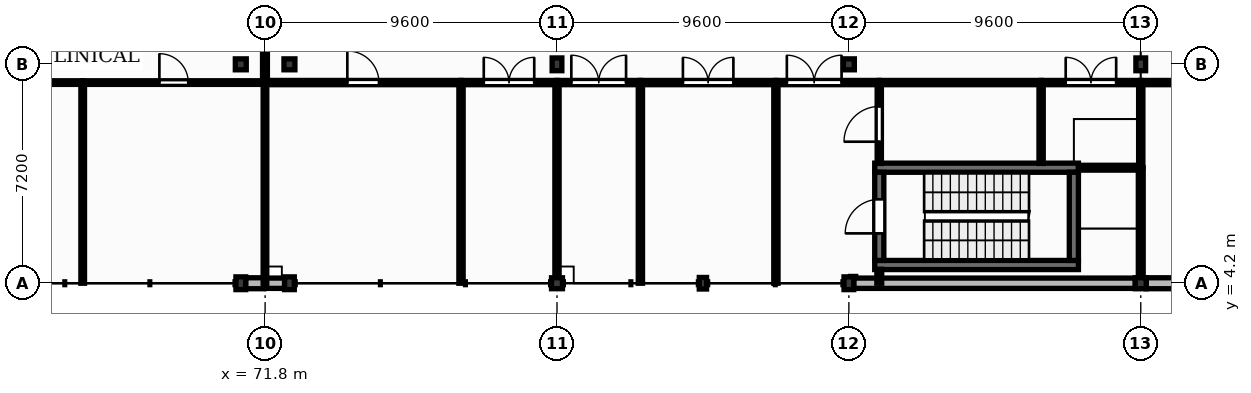
"""IFC4 building model, lengths in metres.
Left out: names, types, materials, properties, quantities, classifications, styles, units other than length and angle.
Written with IfcOpenShell. Run it as: python <this file> out.ifc"""

import sys

from ifc_helpers import new_model, si_unit, direction, frame, frame_2d, origin, origin_2d, place, context, subcontext, project, spatial, rectangle, extrude, element, fill, save


model = new_model("IFC4")
c1 = context("Model", 3, precision=1e-05, world=origin(), true_north=direction((0.0, 1.0)))
c2 = subcontext(c1, "Body", "Model", "MODEL_VIEW")
j1 = project(units=[si_unit("LENGTHUNIT", "METRE"), si_unit("PLANEANGLEUNIT", "RADIAN")], contexts=[c1])
p1 = place(None, origin())
s1 = spatial("IfcSite", under=j1, at=p1, CompositionType="ELEMENT")
p2 = place(p1, origin())
s2 = spatial("IfcBuilding", under=s1, at=p2, CompositionType="ELEMENT")
p3 = place(p2, frame((0.0, 0.0, 4.5)))
s3 = spatial("IfcBuildingStorey", under=s2, at=p3, CompositionType="ELEMENT", Elevation=4.5)
p4 = place(p3, frame((72.6, 4.2, 0.0), z_axis=(0.0, 0.0, 1.0), x_axis=(1.0, 0.0, 0.0)))
e1 = element("IfcColumn", 1, at=p4, inside=s3, PredefinedType="COLUMN", context=c2, shape_type="SweptSolid", body=[
    extrude(rectangle(XDim=0.32, YDim=0.42, at=origin_2d()), origin(), (0.0, 0.0, 1.0), 4.26),
])
for number, where, z_axis, x_axis in (
    (2, (72.6, 11.4, 0.0), (0.0, 0.0, 1.0), (1.0, 0.0, 0.0)),
    (3, (81.4, 4.2, 0.0), (0.0, 0.0, 1.0), (1.0, 0.0, 0.0)),
):
    element("IfcColumn", number, at=place(p3, frame(where, z_axis=z_axis, x_axis=x_axis)), inside=s3, PredefinedType="COLUMN", context=c2, shape_type="SweptSolid", body=[
        extrude(rectangle(XDim=0.36, YDim=0.36, at=origin_2d()), origin(), (0.0, 0.0, 1.0), 4.26),
    ])
for number, where, z_axis, x_axis in (
    (4, (81.4, 11.4, 0.0), (0.0, 0.0, 1.0), (1.0, 0.0, 0.0)),
    (5, (91.0, 4.2, 0.0), (0.0, 0.0, 1.0), (1.0, 0.0, 0.0)),
):
    element("IfcColumn", number, at=place(p3, frame(where, z_axis=z_axis, x_axis=x_axis)), inside=s3, PredefinedType="COLUMN", context=c2, shape_type="SweptSolid", body=[
        extrude(rectangle(XDim=0.32, YDim=0.42, at=origin_2d()), origin(), (0.0, 0.0, 1.0), 4.26),
    ])
for number, where, z_axis, x_axis in (
    (6, (91.0, 11.4, 0.0), (0.0, 0.0, 1.0), (1.0, 0.0, 0.0)),
    (7, (100.6, 4.2, 0.0), (0.0, 0.0, 1.0), (1.0, 0.0, 0.0)),
):
    element("IfcColumn", number, at=place(p3, frame(where, z_axis=z_axis, x_axis=x_axis)), inside=s3, PredefinedType="COLUMN", context=c2, shape_type="SweptSolid", body=[
        extrude(rectangle(XDim=0.36, YDim=0.36, at=origin_2d()), origin(), (0.0, 0.0, 1.0), 4.26),
    ])
for number, where, z_axis, x_axis in (
    (8, (100.6, 11.4, 0.0), (0.0, 0.0, 1.0), (1.0, 0.0, 0.0)),
    (9, (71.0, 4.2, 0.0), (0.0, 0.0, 1.0), (1.0, 0.0, 0.0)),
):
    element("IfcColumn", number, at=place(p3, frame(where, z_axis=z_axis, x_axis=x_axis)), inside=s3, PredefinedType="COLUMN", context=c2, shape_type="SweptSolid", body=[
        extrude(rectangle(XDim=0.32, YDim=0.42, at=origin_2d()), origin(), (0.0, 0.0, 1.0), 4.26),
    ])
p5 = place(p3, frame((71.0, 11.4, 0.0), z_axis=(0.0, 0.0, 1.0), x_axis=(1.0, 0.0, 0.0)))
e10 = element("IfcColumn", 10, at=p5, inside=s3, PredefinedType="COLUMN", context=c2, shape_type="SweptSolid", body=[
    extrude(rectangle(XDim=0.36, YDim=0.36, at=origin_2d()), origin(), (0.0, 0.0, 1.0), 4.26),
])
p6 = place(p3, frame((86.2, 4.2, 0.0), z_axis=(0.0, 0.0, 1.0), x_axis=(1.0, 0.0, 0.0)))
e11 = element("IfcColumn", 11, at=p6, inside=s3, PredefinedType="PILASTER", context=c2, shape_type="SweptSolid", body=[
    extrude(rectangle(XDim=0.24, YDim=0.38, at=origin_2d()), origin(), (0.0, 0.0, 1.0), 4.26),
])
p7 = place(p3, frame((71.16, 4.2, 0.0), z_axis=(0.0, 0.0, 1.0), x_axis=(1.0, 0.0, 0.0)))
e12 = element("IfcWall", 12, at=p7, inside=s3, PredefinedType="SOLIDWALL", context=c2, shape_type="SweptSolid", body=[
    extrude(rectangle(XDim=0.595, YDim=0.36, at=frame_2d((0.297, 0.0))), origin(), (0.0, 0.0, 1.0), 4.26),
])
p8 = place(p3, frame((71.805, 4.2, 0.0), z_axis=(0.0, 0.0, 1.0), x_axis=(1.0, 0.0, 0.0)))
e13 = element("IfcWall", 13, at=p8, inside=s3, PredefinedType="SOLIDWALL", context=c2, shape_type="SweptSolid", body=[
    extrude(rectangle(XDim=0.635, YDim=0.34, at=frame_2d((0.317, 0.0))), origin(), (0.0, 0.0, 1.0), 4.26),
])
p9 = place(p3, frame((91.16, 4.2, 0.0), z_axis=(0.0, 0.0, 1.0), x_axis=(1.0, 0.0, 0.0)))
e14 = element("IfcWall", 14, at=p9, inside=s3, PredefinedType="SOLIDWALL", context=c2, shape_type="SweptSolid", body=[
    extrude(rectangle(XDim=9.26, YDim=0.34, at=frame_2d((4.63, 0.0))), origin(), (0.0, 0.0, 1.0), 3.8),
])
p10 = place(p3, frame((100.78, 4.2, 0.0), z_axis=(0.0, 0.0, 1.0), x_axis=(1.0, 0.0, 0.0)))
e15 = element("IfcWall", 15, at=p10, inside=s3, PredefinedType="SOLIDWALL", context=c2, shape_type="SweptSolid", body=[
    extrude(rectangle(XDim=3.3, YDim=0.36, at=frame_2d((1.65, 0.0))), origin(), (0.0, 0.0, 1.0), 3.8),
])
p11 = place(p10, frame((0.99, 0.0, 1.5)))
e16 = element("IfcOpeningElement", 16, at=p11, cuts=e15, PredefinedType="OPENING", context=c2, shape_type="SweptSolid", body=[
    extrude(rectangle(XDim=1.32, YDim=1.25, at=frame_2d((0.66, 0.625))), frame((0.0, 0.19, 0.0), z_axis=(0.0, -1.0, 0.0), x_axis=(1.0, 0.0, 0.0)), (0.0, 0.0, 1.0), 0.38),
])
for number, where, z_axis, x_axis in (
    (17, (91.85, 4.8, 0.0), (0.0, 0.0, 1.0), (1.0, 0.0, 0.0)),
    (18, (91.85, 8.0, 0.0), (0.0, 0.0, 1.0), (1.0, 0.0, 0.0)),
):
    element("IfcWall", number, at=place(p3, frame(where, z_axis=z_axis, x_axis=x_axis)), inside=s3, PredefinedType="SHEAR", context=c2, shape_type="SweptSolid", body=[
        extrude(rectangle(XDim=6.7, YDim=0.3, at=frame_2d((3.35, 0.0))), origin(), (0.0, 0.0, 1.0), 4.25),
    ])
p12 = place(p3, frame((92.0, 4.95, 0.0), z_axis=(0.0, 0.0, 1.0), x_axis=(0.0, 1.0, 0.0)))
e19 = element("IfcWall", 19, at=p12, inside=s3, PredefinedType="SHEAR", context=c2, shape_type="SweptSolid", body=[
    extrude(rectangle(XDim=2.9, YDim=0.3, at=frame_2d((1.45, 0.0))), origin(), (0.0, 0.0, 1.0), 4.25),
])
p13 = place(p12, frame((0.89, 0.0, 0.0)))
e20 = element("IfcOpeningElement", 20, at=p13, cuts=e19, PredefinedType="OPENING", context=c2, shape_type="SweptSolid", body=[
    extrude(rectangle(XDim=1.12, YDim=2.1, at=frame_2d((0.56, 1.05))), frame((0.0, 0.16, 0.0), z_axis=(0.0, -1.0, 0.0), x_axis=(1.0, 0.0, 0.0)), (0.0, 0.0, 1.0), 0.32),
])
p14 = place(p3, frame((98.4, 4.95, 0.0), z_axis=(0.0, 0.0, 1.0), x_axis=(0.0, 1.0, 0.0)))
e21 = element("IfcWall", 21, at=p14, inside=s3, PredefinedType="SHEAR", context=c2, shape_type="SweptSolid", body=[
    extrude(rectangle(XDim=2.9, YDim=0.3, at=frame_2d((1.45, 0.0))), origin(), (0.0, 0.0, 1.0), 4.25),
])
p15 = place(p3, frame((62.2, 10.8, 0.0), z_axis=(0.0, 0.0, 1.0), x_axis=(1.0, 0.0, 0.0)))
e22 = element("IfcWall", 22, at=p15, inside=s3, PredefinedType="PLUMBINGWALL", context=c2, shape_type="SweptSolid", body=[
    extrude(rectangle(XDim=3.6, YDim=0.12, at=frame_2d((1.8, 0.0))), origin(), (0.0, 0.0, 1.0), 4.18),
])
p16 = place(p15, frame((1.325, 0.0, 0.0)))
e23 = element("IfcOpeningElement", 23, at=p16, cuts=e22, PredefinedType="OPENING", context=c2, shape_type="SweptSolid", body=[
    extrude(rectangle(XDim=0.95, YDim=2.1, at=frame_2d((0.475, 1.05))), frame((0.0, 0.07, 0.0), z_axis=(0.0, -1.0, 0.0), x_axis=(1.0, 0.0, 0.0)), (0.0, 0.0, 1.0), 0.14),
])
p17 = place(p3, frame((65.8, 4.2, 0.0), z_axis=(0.0, 0.0, 1.0), x_axis=(0.0, 1.0, 0.0)))
e24 = element("IfcWall", 24, at=p17, inside=s3, PredefinedType="PLUMBINGWALL", context=c2, shape_type="SweptSolid", body=[
    extrude(rectangle(XDim=6.53, YDim=0.12, at=frame_2d((3.265, 0.0))), origin(), (0.0, 0.0, 1.0), 4.18),
])
p18 = place(p3, frame((65.8, 10.8, 0.0), z_axis=(0.0, 0.0, 1.0), x_axis=(1.0, 0.0, 0.0)))
e25 = element("IfcWall", 25, at=p18, inside=s3, PredefinedType="PLUMBINGWALL", context=c2, shape_type="SweptSolid", body=[
    extrude(rectangle(XDim=5.995, YDim=0.12, at=frame_2d((2.998, 0.0))), origin(), (0.0, 0.0, 1.0), 4.18),
])
p19 = place(p18, frame((2.522, 0.0, 0.0)))
e26 = element("IfcOpeningElement", 26, at=p19, cuts=e25, PredefinedType="OPENING", context=c2, shape_type="SweptSolid", body=[
    extrude(rectangle(XDim=0.95, YDim=2.1, at=frame_2d((0.475, 1.05))), frame((0.0, 0.07, 0.0), z_axis=(0.0, -1.0, 0.0), x_axis=(1.0, 0.0, 0.0)), (0.0, 0.0, 1.0), 0.14),
])
p20 = place(p3, frame((71.805, 10.8, 0.0), z_axis=(0.0, 0.0, 1.0), x_axis=(1.0, 0.0, 0.0)))
e27 = element("IfcWall", 27, at=p20, inside=s3, PredefinedType="PARTITIONING", context=c2, shape_type="SweptSolid", body=[
    extrude(rectangle(XDim=6.438, YDim=0.14, at=frame_2d((3.219, 0.0))), origin(), (0.0, 0.0, 1.0), 4.18),
])
p21 = place(p20, frame((2.699, 0.0, 0.0)))
e28 = element("IfcOpeningElement", 28, at=p21, cuts=e27, PredefinedType="OPENING", context=c2, shape_type="SweptSolid", body=[
    extrude(rectangle(XDim=1.04, YDim=2.1, at=frame_2d((0.52, 1.05))), frame((0.0, 0.08, 0.0), z_axis=(0.0, -1.0, 0.0), x_axis=(1.0, 0.0, 0.0)), (0.0, 0.0, 1.0), 0.16),
])
p22 = place(p3, frame((78.243, 4.2, 0.0), z_axis=(0.0, 0.0, 1.0), x_axis=(0.0, 1.0, 0.0)))
e29 = element("IfcWall", 29, at=p22, inside=s3, PredefinedType="PARTITIONING", context=c2, shape_type="SweptSolid", body=[
    extrude(rectangle(XDim=6.53, YDim=0.14, at=frame_2d((3.265, 0.0))), origin(), (0.0, 0.0, 1.0), 4.18),
])
p23 = place(p3, frame((78.243, 10.8, 0.0), z_axis=(0.0, 0.0, 1.0), x_axis=(1.0, 0.0, 0.0)))
e30 = element("IfcWall", 30, at=p23, inside=s3, PredefinedType="PARTITIONING", context=c2, shape_type="SweptSolid", body=[
    extrude(rectangle(XDim=3.157, YDim=0.14, at=frame_2d((1.579, 0.0))), origin(), (0.0, 0.0, 1.0), 4.18),
])
p24 = place(p23, frame((0.749, 0.0, 0.0)))
e31 = element("IfcOpeningElement", 31, at=p24, cuts=e30, PredefinedType="OPENING", context=c2, shape_type="SweptSolid", body=[
    extrude(rectangle(XDim=1.66, YDim=2.3, at=frame_2d((0.83, 1.15))), frame((0.0, 0.08, 0.0), z_axis=(0.0, -1.0, 0.0), x_axis=(1.0, 0.0, 0.0)), (0.0, 0.0, 1.0), 0.16),
])
p25 = place(p3, frame((81.4, 4.38, 0.0), z_axis=(0.0, 0.0, 1.0), x_axis=(0.0, 1.0, 0.0)))
e32 = element("IfcWall", 32, at=p25, inside=s3, PredefinedType="PARTITIONING", context=c2, shape_type="SweptSolid", body=[
    extrude(rectangle(XDim=6.35, YDim=0.14, at=frame_2d((3.175, 0.0))), origin(), (0.0, 0.0, 1.0), 3.74),
])
p26 = place(p3, frame((81.4, 10.8, 0.0), z_axis=(0.0, 0.0, 1.0), x_axis=(1.0, 0.0, 0.0)))
e33 = element("IfcWall", 33, at=p26, inside=s3, PredefinedType="PARTITIONING", context=c2, shape_type="SweptSolid", body=[
    extrude(rectangle(XDim=2.743, YDim=0.14, at=frame_2d((1.372, 0.0))), origin(), (0.0, 0.0, 1.0), 4.18),
])
p27 = place(p26, frame((0.471, 0.0, 0.0)))
e34 = element("IfcOpeningElement", 34, at=p27, cuts=e33, PredefinedType="OPENING", context=c2, shape_type="SweptSolid", body=[
    extrude(rectangle(XDim=1.8, YDim=2.3, at=frame_2d((0.9, 1.15))), frame((0.0, 0.08, 0.0), z_axis=(0.0, -1.0, 0.0), x_axis=(1.0, 0.0, 0.0)), (0.0, 0.0, 1.0), 0.16),
])
p28 = place(p3, frame((84.143, 4.2, 0.0), z_axis=(0.0, 0.0, 1.0), x_axis=(0.0, 1.0, 0.0)))
e35 = element("IfcWall", 35, at=p28, inside=s3, PredefinedType="PARTITIONING", context=c2, shape_type="SweptSolid", body=[
    extrude(rectangle(XDim=6.53, YDim=0.14, at=frame_2d((3.265, 0.0))), origin(), (0.0, 0.0, 1.0), 4.18),
])
p29 = place(p3, frame((84.143, 10.8, 0.0), z_axis=(0.0, 0.0, 1.0), x_axis=(1.0, 0.0, 0.0)))
e36 = element("IfcWall", 36, at=p29, inside=s3, PredefinedType="PARTITIONING", context=c2, shape_type="SweptSolid", body=[
    extrude(rectangle(XDim=4.457, YDim=0.14, at=frame_2d((2.229, 0.0))), origin(), (0.0, 0.0, 1.0), 4.18),
])
p30 = place(p29, frame((1.398, 0.0, 0.0)))
e37 = element("IfcOpeningElement", 37, at=p30, cuts=e36, PredefinedType="OPENING", context=c2, shape_type="SweptSolid", body=[
    extrude(rectangle(XDim=1.66, YDim=2.3, at=frame_2d((0.83, 1.15))), frame((0.0, 0.08, 0.0), z_axis=(0.0, -1.0, 0.0), x_axis=(1.0, 0.0, 0.0)), (0.0, 0.0, 1.0), 0.16),
])
p31 = place(p3, frame((88.6, 4.2, 0.0), z_axis=(0.0, 0.0, 1.0), x_axis=(0.0, 1.0, 0.0)))
e38 = element("IfcWall", 38, at=p31, inside=s3, PredefinedType="PARTITIONING", context=c2, shape_type="SweptSolid", body=[
    extrude(rectangle(XDim=6.53, YDim=0.14, at=frame_2d((3.265, 0.0))), origin(), (0.0, 0.0, 1.0), 3.9),
])
p32 = place(p3, frame((88.6, 10.8, 0.0), z_axis=(0.0, 0.0, 1.0), x_axis=(1.0, 0.0, 0.0)))
e39 = element("IfcWall", 39, at=p32, inside=s3, PredefinedType="PARTITIONING", context=c2, shape_type="SweptSolid", body=[
    extrude(rectangle(XDim=3.4, YDim=0.14, at=frame_2d((1.7, 0.0))), origin(), (0.0, 0.0, 1.0), 4.18),
])
p33 = place(p32, frame((0.36, 0.0, 0.0)))
e40 = element("IfcOpeningElement", 40, at=p33, cuts=e39, PredefinedType="OPENING", context=c2, shape_type="SweptSolid", body=[
    extrude(rectangle(XDim=1.8, YDim=2.3, at=frame_2d((0.9, 1.15))), frame((0.0, 0.08, 0.0), z_axis=(0.0, -1.0, 0.0), x_axis=(1.0, 0.0, 0.0)), (0.0, 0.0, 1.0), 0.16),
])
p34 = place(p3, frame((92.0, 8.14, 0.0), z_axis=(0.0, 0.0, 1.0), x_axis=(0.0, 1.0, 0.0)))
e41 = element("IfcWall", 41, at=p34, inside=s3, PredefinedType="PARTITIONING", context=c2, shape_type="SweptSolid", body=[
    extrude(rectangle(XDim=2.59, YDim=0.14, at=frame_2d((1.295, 0.0))), origin(), (0.0, 0.0, 1.0), 4.18),
])
p35 = place(p34, frame((0.715, 0.0, 0.0)))
e42 = element("IfcOpeningElement", 42, at=p35, cuts=e41, PredefinedType="OPENING", context=c2, shape_type="SweptSolid", body=[
    extrude(rectangle(XDim=1.16, YDim=2.1, at=frame_2d((0.58, 1.05))), frame((0.0, 0.08, 0.0), z_axis=(0.0, -1.0, 0.0), x_axis=(1.0, 0.0, 0.0)), (0.0, 0.0, 1.0), 0.16),
])
p36 = place(p3, frame((92.0, 10.8, 0.0), z_axis=(0.0, 0.0, 1.0), x_axis=(1.0, 0.0, 0.0)))
e43 = element("IfcWall", 43, at=p36, inside=s3, PredefinedType="PARTITIONING", context=c2, shape_type="SweptSolid", body=[
    extrude(rectangle(XDim=5.323, YDim=0.14, at=frame_2d((2.662, 0.0))), origin(), (0.0, 0.0, 1.0), 4.18),
])
p37 = place(p3, frame((97.323, 8.14, 0.0), z_axis=(0.0, 0.0, 1.0), x_axis=(0.0, 1.0, 0.0)))
e44 = element("IfcWall", 44, at=p37, inside=s3, PredefinedType="PARTITIONING", context=c2, shape_type="SweptSolid", body=[
    extrude(rectangle(XDim=2.59, YDim=0.14, at=frame_2d((1.295, 0.0))), origin(), (0.0, 0.0, 1.0), 4.18),
])
p38 = place(p3, frame((97.323, 10.8, 0.0), z_axis=(0.0, 0.0, 1.0), x_axis=(1.0, 0.0, 0.0)))
e45 = element("IfcWall", 45, at=p38, inside=s3, PredefinedType="PARTITIONING", context=c2, shape_type="SweptSolid", body=[
    extrude(rectangle(XDim=3.277, YDim=0.14, at=frame_2d((1.639, 0.0))), origin(), (0.0, 0.0, 1.0), 4.18),
])
p39 = place(p38, frame((0.809, 0.0, 0.0)))
e46 = element("IfcOpeningElement", 46, at=p39, cuts=e45, PredefinedType="OPENING", context=c2, shape_type="SweptSolid", body=[
    extrude(rectangle(XDim=1.66, YDim=2.3, at=frame_2d((0.83, 1.15))), frame((0.0, 0.08, 0.0), z_axis=(0.0, -1.0, 0.0), x_axis=(1.0, 0.0, 0.0)), (0.0, 0.0, 1.0), 0.16),
])
p40 = place(p3, frame((100.6, 8.0, 0.0), z_axis=(0.0, 0.0, 1.0), x_axis=(0.0, 1.0, 0.0)))
e47 = element("IfcWall", 47, at=p40, inside=s3, PredefinedType="PARTITIONING", context=c2, shape_type="SweptSolid", body=[
    extrude(rectangle(XDim=2.73, YDim=0.14, at=frame_2d((1.365, 0.0))), origin(), (0.0, 0.0, 1.0), 3.74),
])
p41 = place(p3, frame((100.6, 10.8, 0.0), z_axis=(0.0, 0.0, 1.0), x_axis=(1.0, 0.0, 0.0)))
e48 = element("IfcWall", 48, at=p41, inside=s3, PredefinedType="PARTITIONING", context=c2, shape_type="SweptSolid", body=[
    extrude(rectangle(XDim=7.2, YDim=0.14, at=frame_2d((3.6, 0.0))), origin(), (0.0, 0.0, 1.0), 4.18),
])
p42 = place(p41, frame((3.14, 0.0, 0.0)))
e49 = element("IfcOpeningElement", 49, at=p42, cuts=e48, PredefinedType="OPENING", context=c2, shape_type="SweptSolid", body=[
    extrude(rectangle(XDim=0.92, YDim=2.1, at=frame_2d((0.46, 1.05))), frame((0.0, 0.08, 0.0), z_axis=(0.0, -1.0, 0.0), x_axis=(1.0, 0.0, 0.0)), (0.0, 0.0, 1.0), 0.16),
])
p43 = place(p3, frame((71.795, 10.87, 0.0), z_axis=(0.0, 0.0, 1.0), x_axis=(0.0, 1.0, 0.0)))
e50 = element("IfcWall", 50, at=p43, inside=s3, PredefinedType="PARTITIONING", context=c2, shape_type="SweptSolid", body=[
    extrude(rectangle(XDim=2.46, YDim=0.16, at=frame_2d((1.23, 0.0))), origin(), (0.0, 0.0, 1.0), 4.18),
])
p44 = place(p3, frame((92.0, 4.2, 0.0), z_axis=(0.0, 0.0, 1.0), x_axis=(0.0, 1.0, 0.0)))
e51 = element("IfcWall", 51, at=p44, inside=s3, PredefinedType="PARTITIONING", context=c2, shape_type="SweptSolid", body=[
    extrude(rectangle(XDim=0.46, YDim=0.16, at=frame_2d((0.23, 0.0))), origin(), (0.0, 0.0, 1.0), 4.18),
])
p45 = place(p3, frame((71.795, 4.2, 0.0), z_axis=(0.0, 0.0, 1.0), x_axis=(0.0, 1.0, 0.0)))
e52 = element("IfcWall", 52, at=p45, inside=s3, PredefinedType="PLUMBINGWALL", context=c2, shape_type="SweptSolid", body=[
    extrude(rectangle(XDim=6.53, YDim=0.12, at=frame_2d((3.265, 0.0))), origin(), (0.0, 0.0, 1.0), 4.18),
])
p46 = place(p3, frame((98.55, 8.0, 0.0), z_axis=(0.0, 0.0, 1.0), x_axis=(1.0, 0.0, 0.0)))
e53 = element("IfcWall", 53, at=p46, inside=s3, PredefinedType="PARTITIONING", context=c2, shape_type="SweptSolid", body=[
    extrude(rectangle(XDim=2.05, YDim=0.16, at=frame_2d((1.025, 0.0))), origin(), (0.0, 0.0, 1.0), 4.18),
])
p47 = place(p3, frame((100.6, 4.38, 0.0), z_axis=(0.0, 0.0, 1.0), x_axis=(0.0, 1.0, 0.0)))
e54 = element("IfcWall", 54, at=p47, inside=s3, PredefinedType="PARTITIONING", context=c2, shape_type="SweptSolid", body=[
    extrude(rectangle(XDim=3.62, YDim=0.16, at=frame_2d((1.81, 0.0))), origin(), (0.0, 0.0, 1.0), 3.74),
])
p48 = place(p13, origin())
e55 = element("IfcDoor", 55, at=p48, inside=s3, OperationType="SINGLE_SWING_LEFT", PredefinedType="DOOR", context=c2, shape_type="SweptSolid", body=[
    extrude(rectangle(XDim=1.12, YDim=2.1, at=frame_2d((0.56, 1.05))), frame((0.0, 0.025, 0.0), z_axis=(0.0, -1.0, 0.0), x_axis=(1.0, 0.0, 0.0)), (0.0, 0.0, 1.0), 0.05),
])
fill(e20, e55)
p49 = place(p33, origin())
e56 = element("IfcDoor", 56, at=p49, inside=s3, OperationType="DOUBLE_DOOR_SINGLE_SWING", PredefinedType="DOOR", context=c2, shape_type="SweptSolid", body=[
    extrude(rectangle(XDim=1.8, YDim=2.3, at=frame_2d((0.9, 1.15))), frame((0.0, 0.025, 0.0), z_axis=(0.0, -1.0, 0.0), x_axis=(1.0, 0.0, 0.0)), (0.0, 0.0, 1.0), 0.05),
])
fill(e40, e56)
p50 = place(p19, origin())
e57 = element("IfcDoor", 57, at=p50, inside=s3, OperationType="SINGLE_SWING_LEFT", PredefinedType="DOOR", context=c2, shape_type="SweptSolid", body=[
    extrude(rectangle(XDim=0.95, YDim=2.1, at=frame_2d((0.475, 1.05))), frame((0.0, 0.025, 0.0), z_axis=(0.0, -1.0, 0.0), x_axis=(1.0, 0.0, 0.0)), (0.0, 0.0, 1.0), 0.05),
])
fill(e26, e57)
p51 = place(p21, origin())
e58 = element("IfcDoor", 58, at=p51, inside=s3, OperationType="SINGLE_SWING_LEFT", PredefinedType="DOOR", context=c2, shape_type="SweptSolid", body=[
    extrude(rectangle(XDim=1.04, YDim=2.1, at=frame_2d((0.52, 1.05))), frame((0.0, 0.025, 0.0), z_axis=(0.0, -1.0, 0.0), x_axis=(1.0, 0.0, 0.0)), (0.0, 0.0, 1.0), 0.05),
])
fill(e28, e58)
p52 = place(p24, origin())
e59 = element("IfcDoor", 59, at=p52, inside=s3, OperationType="DOUBLE_DOOR_SINGLE_SWING", PredefinedType="DOOR", context=c2, shape_type="SweptSolid", body=[
    extrude(rectangle(XDim=1.66, YDim=2.3, at=frame_2d((0.83, 1.15))), frame((0.0, 0.025, 0.0), z_axis=(0.0, -1.0, 0.0), x_axis=(1.0, 0.0, 0.0)), (0.0, 0.0, 1.0), 0.05),
])
fill(e31, e59)
p53 = place(p27, origin())
e60 = element("IfcDoor", 60, at=p53, inside=s3, OperationType="DOUBLE_DOOR_SINGLE_SWING", PredefinedType="DOOR", context=c2, shape_type="SweptSolid", body=[
    extrude(rectangle(XDim=1.8, YDim=2.3, at=frame_2d((0.9, 1.15))), frame((0.0, 0.025, 0.0), z_axis=(0.0, -1.0, 0.0), x_axis=(1.0, 0.0, 0.0)), (0.0, 0.0, 1.0), 0.05),
])
fill(e34, e60)
p54 = place(p30, origin())
e61 = element("IfcDoor", 61, at=p54, inside=s3, OperationType="DOUBLE_DOOR_SINGLE_SWING", PredefinedType="DOOR", context=c2, shape_type="SweptSolid", body=[
    extrude(rectangle(XDim=1.66, YDim=2.3, at=frame_2d((0.83, 1.15))), frame((0.0, 0.025, 0.0), z_axis=(0.0, -1.0, 0.0), x_axis=(1.0, 0.0, 0.0)), (0.0, 0.0, 1.0), 0.05),
])
fill(e37, e61)
p55 = place(p35, origin())
e62 = element("IfcDoor", 62, at=p55, inside=s3, OperationType="SINGLE_SWING_LEFT", PredefinedType="DOOR", context=c2, shape_type="SweptSolid", body=[
    extrude(rectangle(XDim=1.16, YDim=2.1, at=frame_2d((0.58, 1.05))), frame((0.0, 0.025, 0.0), z_axis=(0.0, -1.0, 0.0), x_axis=(1.0, 0.0, 0.0)), (0.0, 0.0, 1.0), 0.05),
])
fill(e42, e62)
p56 = place(p39, origin())
e63 = element("IfcDoor", 63, at=p56, inside=s3, OperationType="DOUBLE_DOOR_SINGLE_SWING", PredefinedType="DOOR", context=c2, shape_type="SweptSolid", body=[
    extrude(rectangle(XDim=1.66, YDim=2.3, at=frame_2d((0.83, 1.15))), frame((0.0, 0.025, 0.0), z_axis=(0.0, -1.0, 0.0), x_axis=(1.0, 0.0, 0.0)), (0.0, 0.0, 1.0), 0.05),
])
fill(e46, e63)
save(model, sys.argv[1])
